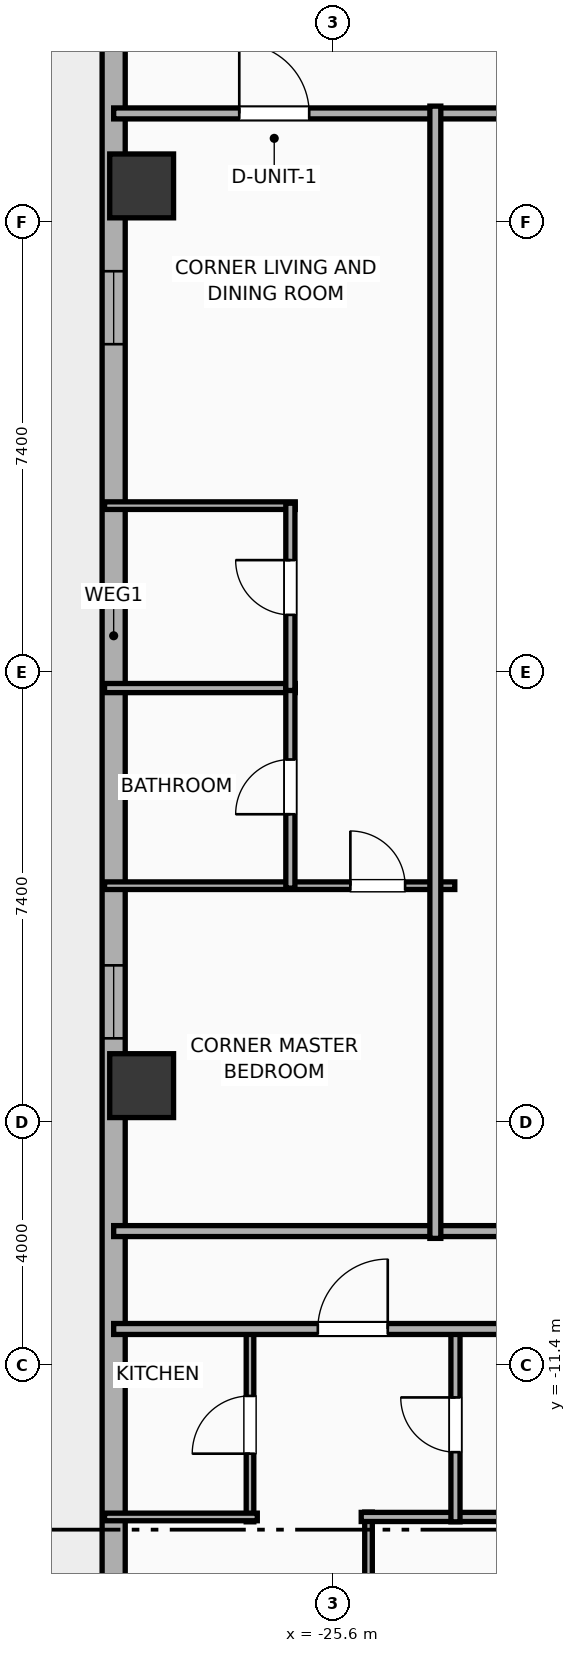
"""IFC4 building model, lengths in metres.
Left out: names, types, materials, properties, quantities, classifications, styles, units other than length and angle.
Written with IfcOpenShell. Run it as: python <this file> out.ifc"""

import sys

from ifc_helpers import new_model, si_unit, direction, frame, frame_2d, origin, origin_2d, place, context, subcontext, project, spatial, rectangle, hollow_rectangle, extrude, element, fill, save


model = new_model("IFC4")
c1 = context("Model", 3, precision=1e-05, world=origin(), true_north=direction((0.0, 1.0)))
c2 = subcontext(c1, "Body", "Model", "MODEL_VIEW")
j1 = project(units=[si_unit("LENGTHUNIT", "METRE"), si_unit("PLANEANGLEUNIT", "RADIAN")], contexts=[c1])
p1 = place(None, origin())
s1 = spatial("IfcSite", under=j1, at=p1, CompositionType="ELEMENT")
p2 = place(p1, origin())
s2 = spatial("IfcBuilding", under=s1, at=p2, CompositionType="ELEMENT")
p3 = place(p2, frame((0.0, 0.0, 85.8)))
s3 = spatial("IfcBuildingStorey", under=s2, at=p3, CompositionType="ELEMENT", Elevation=85.8)
for number, where, z_axis, x_axis in (
    (1, (-28.75, 7.998, -0.4), (0.0, 0.0, 1.0), (1.0, 0.0, 0.0)),
    (2, (-28.75, -6.798, -0.4), (0.0, 0.0, 1.0), (1.0, 0.0, 0.0)),
):
    element("IfcColumn", number, at=place(p3, frame(where, z_axis=z_axis, x_axis=x_axis)), inside=s3, PredefinedType="COLUMN", context=c2, shape_type="SweptSolid", body=[
        extrude(hollow_rectangle(XDim=1.05, YDim=1.05, WallThickness=0.036, at=origin_2d()), origin(), (0.0, 0.0, 1.0), 4.3),
    ])
p4 = place(p3, frame((-29.21, -16.581, 0.0), z_axis=(0.0, 0.0, 1.0), x_axis=(0.0, 1.0, 0.0)))
e3 = element("IfcWall", 3, at=p4, inside=s3, PredefinedType="ELEMENTEDWALL", context=c2, shape_type="SweptSolid", body=[
    extrude(rectangle(XDim=34.363, YDim=0.38, at=frame_2d((17.181, 0.0))), origin(), (0.0, 0.0, 1.0), 2.54),
])
p5 = place(p4, frame((31.437, 0.0, 0.55)))
e4 = element("IfcOpeningElement", 4, at=p5, cuts=e3, PredefinedType="OPENING", context=c2, shape_type="SweptSolid", body=[
    extrude(rectangle(XDim=1.2, YDim=1.15, at=frame_2d((0.6, 0.575))), frame((0.0, 0.2, 0.0), z_axis=(0.0, -1.0, 0.0), x_axis=(1.0, 0.0, 0.0)), (0.0, 0.0, 1.0), 0.4),
])
p6 = place(p4, frame((21.976, 0.0, 0.55)))
e5 = element("IfcOpeningElement", 5, at=p6, cuts=e3, PredefinedType="OPENING", context=c2, shape_type="SweptSolid", body=[
    extrude(rectangle(XDim=1.2, YDim=1.15, at=frame_2d((0.6, 0.575))), frame((0.0, 0.2, 0.0), z_axis=(0.0, -1.0, 0.0), x_axis=(1.0, 0.0, 0.0)), (0.0, 0.0, 1.0), 0.4),
])
p7 = place(p4, frame((10.561, 0.0, 0.55)))
e6 = element("IfcOpeningElement", 6, at=p7, cuts=e3, PredefinedType="OPENING", context=c2, shape_type="SweptSolid", body=[
    extrude(rectangle(XDim=1.2, YDim=1.15, at=frame_2d((0.6, 0.575))), frame((0.0, 0.2, 0.0), z_axis=(0.0, -1.0, 0.0), x_axis=(1.0, 0.0, 0.0)), (0.0, 0.0, 1.0), 0.4),
])
p8 = place(p3, frame((-29.21, 9.19, 0.0), z_axis=(0.0, 0.0, 1.0), x_axis=(1.0, 0.0, 0.0)))
e7 = element("IfcWall", 7, at=p8, inside=s3, PredefinedType="PARTITIONING", context=c2, shape_type="SweptSolid", body=[
    extrude(rectangle(XDim=19.33, YDim=0.18, at=frame_2d((9.665, 0.0))), origin(), (0.0, 0.0, 1.0), 3.65),
])
p9 = place(p8, frame((2.065, 0.0, 0.0)))
e8 = element("IfcOpeningElement", 8, at=p9, cuts=e7, PredefinedType="OPENING", context=c2, shape_type="SweptSolid", body=[
    extrude(rectangle(XDim=1.15, YDim=2.05, at=frame_2d((0.575, 1.025))), frame((0.0, 0.1, 0.0), z_axis=(0.0, -1.0, 0.0), x_axis=(1.0, 0.0, 0.0)), (0.0, 0.0, 1.0), 0.2),
])
p10 = place(p3, frame((-29.21, -9.19, 0.0), z_axis=(0.0, 0.0, 1.0), x_axis=(1.0, 0.0, 0.0)))
e9 = element("IfcWall", 9, at=p10, inside=s3, PredefinedType="PARTITIONING", context=c2, shape_type="SweptSolid", body=[
    extrude(rectangle(XDim=19.33, YDim=0.18, at=frame_2d((9.665, 0.0))), origin(), (0.0, 0.0, 1.0), 3.65),
])
p11 = place(p3, frame((-25.019, -20.56, 0.0), z_axis=(0.0, 0.0, 1.0), x_axis=(0.0, 1.0, 0.0)))
e10 = element("IfcWall", 10, at=p11, inside=s3, PredefinedType="PARTITIONING", context=c2, shape_type="SweptSolid", body=[
    extrude(rectangle(XDim=6.749, YDim=0.125, at=frame_2d((3.375, 0.0))), origin(), (0.0, 0.0, 1.0), 3.65),
])
p12 = place(p11, frame((4.679, 0.0, 0.0)))
e11 = element("IfcOpeningElement", 11, at=p12, cuts=e10, PredefinedType="OPENING", context=c2, shape_type="SweptSolid", body=[
    extrude(rectangle(XDim=0.9, YDim=2.05, at=frame_2d((0.45, 1.025))), frame((0.0, 0.073, 0.0), z_axis=(0.0, -1.0, 0.0), x_axis=(1.0, 0.0, 0.0)), (0.0, 0.0, 1.0), 0.145),
])
p13 = place(p3, frame((-25.139, -13.891, 0.0), z_axis=(0.0, 0.0, 1.0), x_axis=(1.0, 0.0, 0.0)))
e12 = element("IfcWall", 12, at=p13, inside=s3, PredefinedType="PLUMBINGWALL", context=c2, shape_type="SweptSolid", body=[
    extrude(rectangle(XDim=3.79, YDim=0.15, at=frame_2d((1.895, 0.0))), origin(), (0.0, 0.0, 1.0), 3.65),
])
p14 = place(p3, frame((-26.968, -13.971, 0.0), z_axis=(0.0, 0.0, 1.0), x_axis=(0.0, 1.0, 0.0)))
e13 = element("IfcWall", 13, at=p14, inside=s3, PredefinedType="PARTITIONING", context=c2, shape_type="SweptSolid", body=[
    extrude(rectangle(XDim=3.191, YDim=0.125, at=frame_2d((1.595, 0.0))), origin(), (0.0, 0.0, 1.0), 3.65),
])
p15 = place(p14, frame((1.121, 0.0, 0.0)))
e14 = element("IfcOpeningElement", 14, at=p15, cuts=e13, PredefinedType="OPENING", context=c2, shape_type="SweptSolid", body=[
    extrude(rectangle(XDim=0.95, YDim=2.05, at=frame_2d((0.475, 1.025))), frame((0.0, 0.073, 0.0), z_axis=(0.0, -1.0, 0.0), x_axis=(1.0, 0.0, 0.0)), (0.0, 0.0, 1.0), 0.145),
])
p16 = place(p3, frame((-29.36, -13.891, 0.0), z_axis=(0.0, 0.0, 1.0), x_axis=(1.0, 0.0, 0.0)))
e15 = element("IfcWall", 15, at=p16, inside=s3, PredefinedType="PARTITIONING", context=c2, shape_type="SweptSolid", body=[
    extrude(rectangle(XDim=2.512, YDim=0.125, at=frame_2d((1.256, 0.0))), origin(), (0.0, 0.0, 1.0), 3.65),
])
p17 = place(p3, frame((-23.589, -13.971, 0.0), z_axis=(0.0, 0.0, 1.0), x_axis=(0.0, 1.0, 0.0)))
e16 = element("IfcWall", 16, at=p17, inside=s3, PredefinedType="PLUMBINGWALL", context=c2, shape_type="SweptSolid", body=[
    extrude(rectangle(XDim=3.191, YDim=0.15, at=frame_2d((1.595, 0.0))), origin(), (0.0, 0.0, 1.0), 3.65),
])
p18 = place(p17, frame((1.146, 0.0, 0.0)))
e17 = element("IfcOpeningElement", 17, at=p18, cuts=e16, PredefinedType="OPENING", context=c2, shape_type="SweptSolid", body=[
    extrude(rectangle(XDim=0.9, YDim=2.05, at=frame_2d((0.45, 1.025))), frame((0.0, 0.085, 0.0), z_axis=(0.0, -1.0, 0.0), x_axis=(1.0, 0.0, 0.0)), (0.0, 0.0, 1.0), 0.17),
])
p19 = place(p3, frame((-29.21, -10.8, 0.0), z_axis=(0.0, 0.0, 1.0), x_axis=(1.0, 0.0, 0.0)))
e18 = element("IfcWall", 18, at=p19, inside=s3, PredefinedType="PARTITIONING", context=c2, shape_type="SweptSolid", body=[
    extrude(rectangle(XDim=62.42, YDim=0.18, at=frame_2d((31.21, 0.0))), origin(), (0.0, 0.0, 1.0), 3.65),
])
p20 = place(p19, frame((3.357, 0.0, 0.0)))
e19 = element("IfcOpeningElement", 19, at=p20, cuts=e18, PredefinedType="OPENING", context=c2, shape_type="SweptSolid", body=[
    extrude(rectangle(XDim=1.15, YDim=2.05, at=frame_2d((0.575, 1.025))), frame((0.0, 0.1, 0.0), z_axis=(0.0, -1.0, 0.0), x_axis=(1.0, 0.0, 0.0)), (0.0, 0.0, 1.0), 0.2),
])
p21 = place(p19, frame((10.998, 0.0, 0.0)))
e20 = element("IfcOpeningElement", 20, at=p21, cuts=e18, PredefinedType="OPENING", context=c2, shape_type="SweptSolid", body=[
    extrude(rectangle(XDim=1.15, YDim=2.05, at=frame_2d((0.575, 1.025))), frame((0.0, 0.1, 0.0), z_axis=(0.0, -1.0, 0.0), x_axis=(1.0, 0.0, 0.0)), (0.0, 0.0, 1.0), 0.2),
])
p22 = place(p19, frame((18.482, 0.0, 0.0)))
e21 = element("IfcOpeningElement", 21, at=p22, cuts=e18, PredefinedType="OPENING", context=c2, shape_type="SweptSolid", body=[
    extrude(rectangle(XDim=1.15, YDim=2.05, at=frame_2d((0.575, 1.025))), frame((0.0, 0.1, 0.0), z_axis=(0.0, -1.0, 0.0), x_axis=(1.0, 0.0, 0.0)), (0.0, 0.0, 1.0), 0.2),
])
p23 = place(p19, frame((23.962, 0.0, 0.0)))
e22 = element("IfcOpeningElement", 22, at=p23, cuts=e18, PredefinedType="OPENING", context=c2, shape_type="SweptSolid", body=[
    extrude(rectangle(XDim=1.15, YDim=2.05, at=frame_2d((0.575, 1.025))), frame((0.0, 0.1, 0.0), z_axis=(0.0, -1.0, 0.0), x_axis=(1.0, 0.0, 0.0)), (0.0, 0.0, 1.0), 0.2),
])
p24 = place(p19, frame((29.524, 0.0, 0.0)))
e23 = element("IfcOpeningElement", 23, at=p24, cuts=e18, PredefinedType="OPENING", context=c2, shape_type="SweptSolid", body=[
    extrude(rectangle(XDim=1.15, YDim=2.05, at=frame_2d((0.575, 1.025))), frame((0.0, 0.1, 0.0), z_axis=(0.0, -1.0, 0.0), x_axis=(1.0, 0.0, 0.0)), (0.0, 0.0, 1.0), 0.2),
])
p25 = place(p19, frame((34.218, 0.0, 0.0)))
e24 = element("IfcOpeningElement", 24, at=p25, cuts=e18, PredefinedType="OPENING", context=c2, shape_type="SweptSolid", body=[
    extrude(rectangle(XDim=0.9, YDim=2.05, at=frame_2d((0.45, 1.025))), frame((0.0, 0.1, 0.0), z_axis=(0.0, -1.0, 0.0), x_axis=(1.0, 0.0, 0.0)), (0.0, 0.0, 1.0), 0.2),
])
p26 = place(p19, frame((38.313, 0.0, 0.0)))
e25 = element("IfcOpeningElement", 25, at=p26, cuts=e18, PredefinedType="OPENING", context=c2, shape_type="SweptSolid", body=[
    extrude(rectangle(XDim=1.15, YDim=2.05, at=frame_2d((0.575, 1.025))), frame((0.0, 0.1, 0.0), z_axis=(0.0, -1.0, 0.0), x_axis=(1.0, 0.0, 0.0)), (0.0, 0.0, 1.0), 0.2),
])
p27 = place(p19, frame((45.223, 0.0, 0.0)))
e26 = element("IfcOpeningElement", 26, at=p27, cuts=e18, PredefinedType="OPENING", context=c2, shape_type="SweptSolid", body=[
    extrude(rectangle(XDim=0.9, YDim=2.05, at=frame_2d((0.45, 1.025))), frame((0.0, 0.1, 0.0), z_axis=(0.0, -1.0, 0.0), x_axis=(1.0, 0.0, 0.0)), (0.0, 0.0, 1.0), 0.2),
])
p28 = place(p19, frame((51.352, 0.0, 0.0)))
e27 = element("IfcOpeningElement", 27, at=p28, cuts=e18, PredefinedType="OPENING", context=c2, shape_type="SweptSolid", body=[
    extrude(rectangle(XDim=1.15, YDim=2.05, at=frame_2d((0.575, 1.025))), frame((0.0, 0.1, 0.0), z_axis=(0.0, -1.0, 0.0), x_axis=(1.0, 0.0, 0.0)), (0.0, 0.0, 1.0), 0.2),
])
p29 = place(p19, frame((58.493, 0.0, 0.0)))
e28 = element("IfcOpeningElement", 28, at=p29, cuts=e18, PredefinedType="OPENING", context=c2, shape_type="SweptSolid", body=[
    extrude(rectangle(XDim=1.15, YDim=2.05, at=frame_2d((0.575, 1.025))), frame((0.0, 0.1, 0.0), z_axis=(0.0, -1.0, 0.0), x_axis=(1.0, 0.0, 0.0)), (0.0, 0.0, 1.0), 0.2),
])
p30 = place(p3, frame((-29.36, 2.74, 0.0), z_axis=(0.0, 0.0, 1.0), x_axis=(1.0, 0.0, 0.0)))
e29 = element("IfcWall", 29, at=p30, inside=s3, PredefinedType="PARTITIONING", context=c2, shape_type="SweptSolid", body=[
    extrude(rectangle(XDim=3.136, YDim=0.125, at=frame_2d((1.568, 0.0))), origin(), (0.0, 0.0, 1.0), 3.65),
])
p31 = place(p3, frame((-29.36, -0.26, 0.0), z_axis=(0.0, 0.0, 1.0), x_axis=(1.0, 0.0, 0.0)))
e30 = element("IfcWall", 30, at=p31, inside=s3, PredefinedType="PLUMBINGWALL", context=c2, shape_type="SweptSolid", body=[
    extrude(rectangle(XDim=3.136, YDim=0.15, at=frame_2d((1.568, 0.0))), origin(), (0.0, 0.0, 1.0), 3.65),
])
p32 = place(p3, frame((-29.36, -3.51, 0.0), z_axis=(0.0, 0.0, 1.0), x_axis=(1.0, 0.0, 0.0)))
e31 = element("IfcWall", 31, at=p32, inside=s3, PredefinedType="PARTITIONING", context=c2, shape_type="SweptSolid", body=[
    extrude(rectangle(XDim=5.76, YDim=0.125, at=frame_2d((2.88, 0.0))), origin(), (0.0, 0.0, 1.0), 3.65),
])
p33 = place(p32, frame((4.043, 0.0, 0.0)))
e32 = element("IfcOpeningElement", 32, at=p33, cuts=e31, PredefinedType="OPENING", context=c2, shape_type="SweptSolid", body=[
    extrude(rectangle(XDim=0.9, YDim=2.05, at=frame_2d((0.45, 1.025))), frame((0.0, 0.073, 0.0), z_axis=(0.0, -1.0, 0.0), x_axis=(1.0, 0.0, 0.0)), (0.0, 0.0, 1.0), 0.145),
])
p34 = place(p3, frame((-26.304, -3.55, 0.0), z_axis=(0.0, 0.0, 1.0), x_axis=(0.0, 1.0, 0.0)))
e33 = element("IfcWall", 33, at=p34, inside=s3, PredefinedType="PLUMBINGWALL", context=c2, shape_type="SweptSolid", body=[
    extrude(rectangle(XDim=3.33, YDim=0.15, at=frame_2d((1.665, 0.0))), origin(), (0.0, 0.0, 1.0), 3.65),
])
p35 = place(p34, frame((1.215, 0.0, 0.0)))
e34 = element("IfcOpeningElement", 34, at=p35, cuts=e33, PredefinedType="OPENING", context=c2, shape_type="SweptSolid", body=[
    extrude(rectangle(XDim=0.9, YDim=2.05, at=frame_2d((0.45, 1.025))), frame((0.0, 0.085, 0.0), z_axis=(0.0, -1.0, 0.0), x_axis=(1.0, 0.0, 0.0)), (0.0, 0.0, 1.0), 0.17),
])
p36 = place(p3, frame((-26.304, -0.3, 0.0), z_axis=(0.0, 0.0, 1.0), x_axis=(0.0, 1.0, 0.0)))
e35 = element("IfcWall", 35, at=p36, inside=s3, PredefinedType="PLUMBINGWALL", context=c2, shape_type="SweptSolid", body=[
    extrude(rectangle(XDim=3.08, YDim=0.15, at=frame_2d((1.54, 0.0))), origin(), (0.0, 0.0, 1.0), 3.65),
])
p37 = place(p36, frame((1.244, 0.0, 0.0)))
e36 = element("IfcOpeningElement", 36, at=p37, cuts=e35, PredefinedType="OPENING", context=c2, shape_type="SweptSolid", body=[
    extrude(rectangle(XDim=0.9, YDim=2.05, at=frame_2d((0.45, 1.025))), frame((0.0, 0.085, 0.0), z_axis=(0.0, -1.0, 0.0), x_axis=(1.0, 0.0, 0.0)), (0.0, 0.0, 1.0), 0.17),
])
p38 = place(p3, frame((-23.92, -9.31, 0.0), z_axis=(0.0, 0.0, 1.0), x_axis=(0.0, 1.0, 0.0)))
e37 = element("IfcWall", 37, at=p38, inside=s3, PredefinedType="PARTITIONING", context=c2, shape_type="SweptSolid", body=[
    extrude(rectangle(XDim=18.62, YDim=0.18, at=frame_2d((9.31, 0.0))), origin(), (0.0, 0.0, 1.0), 3.65),
])
p39 = place(p6, origin())
e38 = element("IfcWindow", 38, at=p39, inside=s3, PartitioningType="SINGLE_PANEL", PredefinedType="WINDOW", context=c2, shape_type="SweptSolid", body=[
    extrude(rectangle(XDim=1.2, YDim=1.15, at=frame_2d((0.6, 0.575))), frame((0.0, 0.03, 0.0), z_axis=(0.0, -1.0, 0.0), x_axis=(1.0, 0.0, 0.0)), (0.0, 0.0, 1.0), 0.06),
])
fill(e5, e38)
p40 = place(p7, origin())
e39 = element("IfcWindow", 39, at=p40, inside=s3, PartitioningType="SINGLE_PANEL", PredefinedType="WINDOW", context=c2, shape_type="SweptSolid", body=[
    extrude(rectangle(XDim=1.2, YDim=1.15, at=frame_2d((0.6, 0.575))), frame((0.0, 0.03, 0.0), z_axis=(0.0, -1.0, 0.0), x_axis=(1.0, 0.0, 0.0)), (0.0, 0.0, 1.0), 0.06),
])
fill(e6, e39)
p41 = place(p9, origin())
e40 = element("IfcDoor", 40, at=p41, inside=s3, OperationType="SINGLE_SWING_LEFT", PredefinedType="DOOR", context=c2, shape_type="SweptSolid", body=[
    extrude(rectangle(XDim=1.15, YDim=2.05, at=frame_2d((0.575, 1.025))), frame((0.0, 0.025, 0.0), z_axis=(0.0, -1.0, 0.0), x_axis=(1.0, 0.0, 0.0)), (0.0, 0.0, 1.0), 0.05),
])
fill(e8, e40)
p42 = place(p15, origin())
e41 = element("IfcDoor", 41, at=p42, inside=s3, OperationType="SINGLE_SWING_LEFT", PredefinedType="DOOR", context=c2, shape_type="SweptSolid", body=[
    extrude(rectangle(XDim=0.95, YDim=2.05, at=frame_2d((0.475, 1.025))), frame((0.0, 0.025, 0.0), z_axis=(0.0, -1.0, 0.0), x_axis=(1.0, 0.0, 0.0)), (0.0, 0.0, 1.0), 0.05),
])
fill(e14, e41)
p43 = place(p18, origin())
e42 = element("IfcDoor", 42, at=p43, inside=s3, OperationType="SINGLE_SWING_RIGHT", PredefinedType="DOOR", context=c2, shape_type="SweptSolid", body=[
    extrude(rectangle(XDim=0.9, YDim=2.05, at=frame_2d((0.45, 1.025))), frame((0.0, 0.025, 0.0), z_axis=(0.0, -1.0, 0.0), x_axis=(1.0, 0.0, 0.0)), (0.0, 0.0, 1.0), 0.05),
])
fill(e17, e42)
p44 = place(p20, origin())
e43 = element("IfcDoor", 43, at=p44, inside=s3, OperationType="SINGLE_SWING_RIGHT", PredefinedType="DOOR", context=c2, shape_type="SweptSolid", body=[
    extrude(rectangle(XDim=1.15, YDim=2.05, at=frame_2d((0.575, 1.025))), frame((0.0, 0.025, 0.0), z_axis=(0.0, -1.0, 0.0), x_axis=(1.0, 0.0, 0.0)), (0.0, 0.0, 1.0), 0.05),
])
fill(e19, e43)
p45 = place(p33, origin())
e44 = element("IfcDoor", 44, at=p45, inside=s3, OperationType="SINGLE_SWING_LEFT", PredefinedType="DOOR", context=c2, shape_type="SweptSolid", body=[
    extrude(rectangle(XDim=0.9, YDim=2.05, at=frame_2d((0.45, 1.025))), frame((0.0, 0.025, 0.0), z_axis=(0.0, -1.0, 0.0), x_axis=(1.0, 0.0, 0.0)), (0.0, 0.0, 1.0), 0.05),
])
fill(e32, e44)
p46 = place(p35, origin())
e45 = element("IfcDoor", 45, at=p46, inside=s3, OperationType="SINGLE_SWING_LEFT", PredefinedType="DOOR", context=c2, shape_type="SweptSolid", body=[
    extrude(rectangle(XDim=0.9, YDim=2.05, at=frame_2d((0.45, 1.025))), frame((0.0, 0.025, 0.0), z_axis=(0.0, -1.0, 0.0), x_axis=(1.0, 0.0, 0.0)), (0.0, 0.0, 1.0), 0.05),
])
fill(e34, e45)
p47 = place(p37, origin())
e46 = element("IfcDoor", 46, at=p47, inside=s3, OperationType="SINGLE_SWING_RIGHT", PredefinedType="DOOR", context=c2, shape_type="SweptSolid", body=[
    extrude(rectangle(XDim=0.9, YDim=2.05, at=frame_2d((0.45, 1.025))), frame((0.0, 0.025, 0.0), z_axis=(0.0, -1.0, 0.0), x_axis=(1.0, 0.0, 0.0)), (0.0, 0.0, 1.0), 0.05),
])
fill(e36, e46)
save(model, sys.argv[1])
